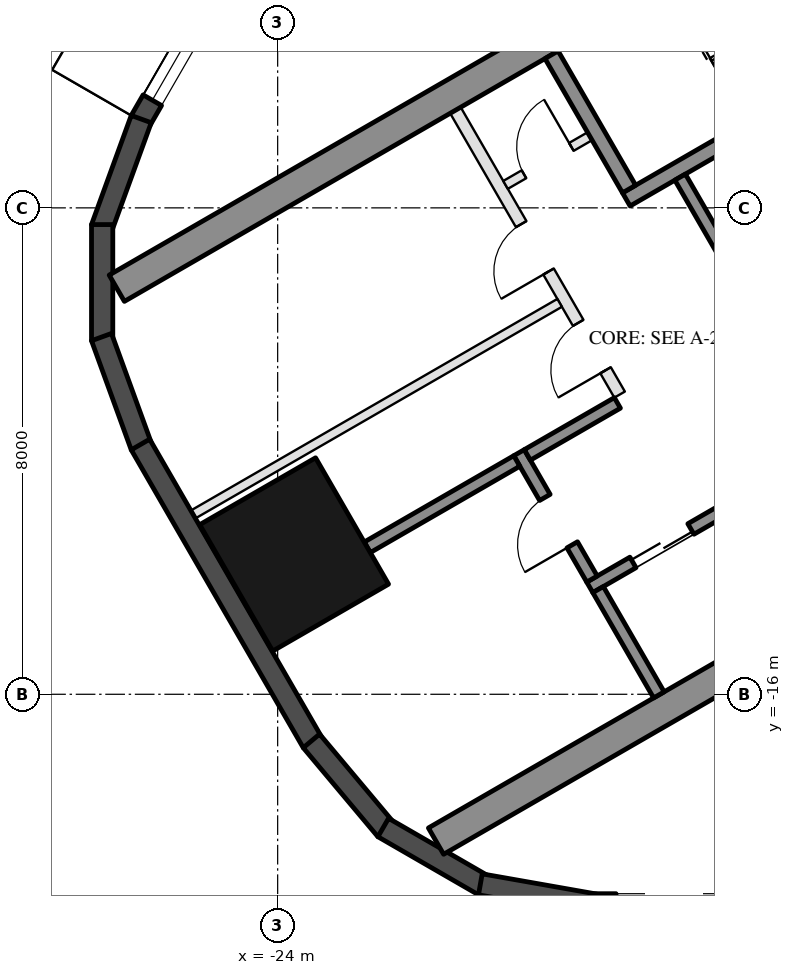
"""IFC4 building model, lengths in metres.
Left out: names, types, materials, properties, quantities, classifications, styles, units other than length and angle.
Written with IfcOpenShell. Run it as: python <this file> out.ifc"""

import sys

from ifc_helpers import new_model, si_unit, direction, frame, frame_2d, origin, origin_2d, place, context, subcontext, project, spatial, rectangle, hollow_rectangle, extrude, element, fill, save


model = new_model("IFC4")
c1 = context("Model", 3, precision=1e-05, world=origin(), true_north=direction((0.0, 1.0)))
c2 = subcontext(c1, "Body", "Model", "MODEL_VIEW")
j1 = project(units=[si_unit("LENGTHUNIT", "METRE"), si_unit("PLANEANGLEUNIT", "RADIAN")], contexts=[c1])
p1 = place(None, origin())
s1 = spatial("IfcSite", under=j1, at=p1, CompositionType="ELEMENT")
p2 = place(p1, origin())
s2 = spatial("IfcBuilding", under=s1, at=p2, CompositionType="ELEMENT")
p3 = place(p2, frame((0.0, 0.0, 224.3)))
s3 = spatial("IfcBuildingStorey", under=s2, at=p3, CompositionType="ELEMENT", Elevation=224.3)
p4 = place(p3, frame((-23.729, -13.7, 0.0), z_axis=(0.0, 0.0, 1.0), x_axis=(-0.5, 0.866025403784, 0.0)))
e1 = element("IfcColumn", 1, at=p4, inside=s3, PredefinedType="COLUMN", context=c2, shape_type="SweptSolid", body=[
    extrude(hollow_rectangle(XDim=2.4, YDim=2.2, WallThickness=0.06, at=origin_2d()), origin(), (0.0, 0.0, 1.0), 3.7),
])
p5 = place(p3, frame((-24.299, -3.176, 0.0), z_axis=(0.0, 0.0, 1.0), x_axis=(-0.500028278809, -0.866009076391, 0.0)))
e2 = element("IfcWall", 2, at=p5, inside=s3, PredefinedType="SOLIDWALL", context=c2, shape_type="SweptSolid", body=[
    extrude(rectangle(XDim=3.916, YDim=0.35, at=frame_2d((1.958, 0.0))), origin(), (0.0, 0.0, 1.0), 3.55),
])
p6 = place(p5, frame((1.625, 0.0, 0.3)))
e3 = element("IfcOpeningElement", 3, at=p6, cuts=e2, PredefinedType="OPENING", context=c2, shape_type="SweptSolid", body=[
    extrude(rectangle(XDim=1.9, YDim=2.65, at=frame_2d((0.95, 1.325))), frame((0.0, 0.185, 0.0), z_axis=(0.0, -1.0, 0.0), x_axis=(1.0, 0.0, 0.0)), (0.0, 0.0, 1.0), 0.37),
])
for number, where, z_axis, x_axis in (
    (4, (-26.244, -6.54, 0.0), (0.0, 0.0, 1.0), (-0.342, -0.94, 0.0)),
    (5, (-26.886, -8.275, 0.0), (0.0, 0.0, 1.0), (0.0, -1.0, 0.0)),
    (6, (-26.897, -10.125, 0.0), (0.0, 0.0, 1.0), (0.342, -0.94, 0.0)),
):
    element("IfcWall", number, at=place(p3, frame(where, z_axis=z_axis, x_axis=x_axis)), inside=s3, PredefinedType="SOLIDWALL", context=c2, shape_type="SweptSolid", body=[
        extrude(rectangle(XDim=1.91, YDim=0.35, at=frame_2d((0.955, 0.0))), origin(), (0.0, 0.0, 1.0), 3.55),
    ])
p7 = place(p3, frame((-26.257, -11.893, 0.0), z_axis=(0.0, 0.0, 1.0), x_axis=(0.500018773155, -0.866014564827, 0.0)))
e7 = element("IfcWall", 7, at=p7, inside=s3, PredefinedType="SOLIDWALL", context=c2, shape_type="SweptSolid", body=[
    extrude(rectangle(XDim=5.658, YDim=0.35, at=frame_2d((2.829, 0.0))), origin(), (0.0, 0.0, 1.0), 3.55),
])
for number, where, z_axis, x_axis in (
    (8, (-23.445, -16.768, 0.0), (0.0, 0.0, 1.0), (0.643, -0.766, 0.0)),
    (9, (-22.264, -18.192, 0.0), (0.0, 0.0, 1.0), (0.866, -0.5, 0.0)),
):
    element("IfcWall", number, at=place(p3, frame(where, z_axis=z_axis, x_axis=x_axis)), inside=s3, PredefinedType="SOLIDWALL", context=c2, shape_type="SweptSolid", body=[
        extrude(rectangle(XDim=1.91, YDim=0.35, at=frame_2d((0.955, 0.0))), origin(), (0.0, 0.0, 1.0), 3.55),
    ])
p8 = place(p3, frame((-20.667, -19.126, 0.0), z_axis=(0.0, 0.0, 1.0), x_axis=(0.984798995425, -0.173697837091, 0.0)))
e10 = element("IfcWall", 10, at=p8, inside=s3, PredefinedType="SOLIDWALL", context=c2, shape_type="SweptSolid", body=[
    extrude(rectangle(XDim=1.91, YDim=0.35, at=frame_2d((0.955, 0.0))), origin(), (0.0, 0.0, 1.0), 3.55),
])
p9 = place(p3, frame((-18.816, -19.455, 0.0), z_axis=(0.0, 0.0, 1.0), x_axis=(1.0, 0.0, 0.0)))
e11 = element("IfcWall", 11, at=p9, inside=s3, PredefinedType="SOLIDWALL", context=c2, shape_type="SweptSolid", body=[
    extrude(rectangle(XDim=11.816, YDim=0.35, at=frame_2d((5.908, 0.0))), origin(), (0.0, 0.0, 1.0), 3.55),
])
p10 = place(p9, frame((0.381, 0.0, 0.3)))
e12 = element("IfcOpeningElement", 12, at=p10, cuts=e11, PredefinedType="OPENING", context=c2, shape_type="SweptSolid", body=[
    extrude(rectangle(XDim=1.9, YDim=2.65, at=frame_2d((0.95, 1.325))), frame((0.0, 0.185, 0.0), z_axis=(0.0, -1.0, 0.0), x_axis=(1.0, 0.0, 0.0)), (0.0, 0.0, 1.0), 0.37),
])
p11 = place(p9, frame((7.79, 0.0, 0.0)))
e13 = element("IfcOpeningElement", 13, at=p11, cuts=e11, PredefinedType="OPENING", context=c2, shape_type="SweptSolid", body=[
    extrude(rectangle(XDim=2.4, YDim=2.4, at=frame_2d((1.2, 1.2))), frame((0.0, 0.185, 0.0), z_axis=(0.0, -1.0, 0.0), x_axis=(1.0, 0.0, 0.0)), (0.0, 0.0, 1.0), 0.37),
])
p12 = place(p9, frame((3.741, 0.0, 0.3)))
e14 = element("IfcOpeningElement", 14, at=p12, cuts=e11, PredefinedType="OPENING", context=c2, shape_type="SweptSolid", body=[
    extrude(rectangle(XDim=1.7, YDim=2.65, at=frame_2d((0.85, 1.325))), frame((0.0, 0.185, 0.0), z_axis=(0.0, -1.0, 0.0), x_axis=(1.0, 0.0, 0.0)), (0.0, 0.0, 1.0), 0.37),
])
p13 = place(p9, frame((5.741, 0.0, 0.3)))
e15 = element("IfcOpeningElement", 15, at=p13, cuts=e11, PredefinedType="OPENING", context=c2, shape_type="SweptSolid", body=[
    extrude(rectangle(XDim=1.7, YDim=2.65, at=frame_2d((0.85, 1.325))), frame((0.0, 0.185, 0.0), z_axis=(0.0, -1.0, 0.0), x_axis=(1.0, 0.0, 0.0)), (0.0, 0.0, 1.0), 0.37),
])
for number, where, z_axis, x_axis in (
    (16, (-13.797, -1.903, 0.0), (0.0, 0.0, 1.0), (-0.866, -0.5, 0.0)),
    (17, (-8.547, -10.997, 0.0), (0.0, 0.0, 1.0), (-0.866, -0.5, 0.0)),
):
    element("IfcWall", number, at=place(p3, frame(where, z_axis=z_axis, x_axis=x_axis)), inside=s3, PredefinedType="SHEAR", context=c2, shape_type="SweptSolid", body=[
        extrude(rectangle(XDim=14.837, YDim=0.5, at=frame_2d((7.418, 0.0))), origin(), (0.0, 0.0, 1.0), 3.5),
    ])
p14 = place(p3, frame((-12.681, -4.636, 0.0), z_axis=(0.0, 0.0, 1.0), x_axis=(-0.866021702275, -0.500006411147, 0.0)))
e18 = element("IfcWall", 18, at=p14, inside=s3, PredefinedType="SHEAR", context=c2, shape_type="SweptSolid", body=[
    extrude(rectangle(XDim=6.45, YDim=0.25, at=frame_2d((3.225, 0.0))), origin(), (0.0, 0.0, 1.0), 3.5),
])
p15 = place(p14, frame((0.3, 0.0, 0.0)))
e19 = element("IfcOpeningElement", 19, at=p15, cuts=e18, PredefinedType="OPENING", context=c2, shape_type="SweptSolid", body=[
    extrude(rectangle(XDim=1.0, YDim=2.1, at=frame_2d((0.5, 1.05))), frame((0.0, 0.135, 0.0), z_axis=(0.0, -1.0, 0.0), x_axis=(1.0, 0.0, 0.0)), (0.0, 0.0, 1.0), 0.27),
])
p16 = place(p3, frame((-19.496, -5.482, 0.0), z_axis=(0.0, 0.0, 1.0), x_axis=(0.499990435942, -0.866030925526, 0.0)))
e20 = element("IfcWall", 20, at=p16, inside=s3, PredefinedType="SHEAR", context=c2, shape_type="SweptSolid", body=[
    extrude(rectangle(XDim=2.55, YDim=0.25, at=frame_2d((1.275, 0.0))), origin(), (0.0, 0.0, 1.0), 3.5),
])
p17 = place(p3, frame((-17.381, -7.495, 0.0), z_axis=(0.0, 0.0, 1.0), x_axis=(0.500011755427, -0.866018616679, 0.0)))
e21 = element("IfcWall", 21, at=p17, inside=s3, PredefinedType="SHEAR", context=c2, shape_type="SweptSolid", body=[
    extrude(rectangle(XDim=2.8, YDim=0.2, at=frame_2d((1.4, 0.0))), origin(), (0.0, 0.0, 1.0), 3.5),
])
p18 = place(p3, frame((-10.068, -9.162, 0.0), z_axis=(0.0, 0.0, 1.0), x_axis=(-0.866032725843, -0.499987317609, 0.0)))
e22 = element("IfcWall", 22, at=p18, inside=s3, PredefinedType="SHEAR", context=c2, shape_type="SweptSolid", body=[
    extrude(rectangle(XDim=10.16, YDim=0.2, at=frame_2d((5.08, 0.0))), origin(), (0.0, 0.0, 1.0), 3.5),
])
p19 = place(p18, frame((0.62, 0.0, 0.0)))
e23 = element("IfcOpeningElement", 23, at=p19, cuts=e22, PredefinedType="OPENING", context=c2, shape_type="SweptSolid", body=[
    extrude(rectangle(XDim=1.1, YDim=2.1, at=frame_2d((0.55, 1.05))), frame((0.0, 0.11, 0.0), z_axis=(0.0, -1.0, 0.0), x_axis=(1.0, 0.0, 0.0)), (0.0, 0.0, 1.0), 0.22),
])
p20 = place(p18, frame((3.16, 0.0, 0.0)))
e24 = element("IfcOpeningElement", 24, at=p20, cuts=e22, PredefinedType="OPENING", context=c2, shape_type="SweptSolid", body=[
    extrude(rectangle(XDim=1.1, YDim=2.1, at=frame_2d((0.55, 1.05))), frame((0.0, 0.11, 0.0), z_axis=(0.0, -1.0, 0.0), x_axis=(1.0, 0.0, 0.0)), (0.0, 0.0, 1.0), 0.22),
])
p21 = place(p18, frame((5.7, 0.0, 0.0)))
e25 = element("IfcOpeningElement", 25, at=p21, cuts=e22, PredefinedType="OPENING", context=c2, shape_type="SweptSolid", body=[
    extrude(rectangle(XDim=1.1, YDim=2.1, at=frame_2d((0.55, 1.05))), frame((0.0, 0.11, 0.0), z_axis=(0.0, -1.0, 0.0), x_axis=(1.0, 0.0, 0.0)), (0.0, 0.0, 1.0), 0.22),
])
p22 = place(p18, frame((8.24, 0.0, 0.0)))
e26 = element("IfcOpeningElement", 26, at=p22, cuts=e22, PredefinedType="OPENING", context=c2, shape_type="SweptSolid", body=[
    extrude(rectangle(XDim=1.1, YDim=2.1, at=frame_2d((0.55, 1.05))), frame((0.0, 0.11, 0.0), z_axis=(0.0, -1.0, 0.0), x_axis=(1.0, 0.0, 0.0)), (0.0, 0.0, 1.0), 0.22),
])
p23 = place(p3, frame((-20.031, -12.026, 0.0), z_axis=(0.0, 0.0, 1.0), x_axis=(0.500033551112, -0.866006032174, 0.0)))
e27 = element("IfcWall", 27, at=p23, inside=s3, PredefinedType="SHEAR", context=c2, shape_type="SweptSolid", body=[
    extrude(rectangle(XDim=2.4, YDim=0.2, at=frame_2d((1.2, 0.0))), origin(), (0.0, 0.0, 1.0), 3.5),
])
p24 = place(p23, frame((0.85, 0.0, 0.0)))
e28 = element("IfcOpeningElement", 28, at=p24, cuts=e27, PredefinedType="OPENING", context=c2, shape_type="SweptSolid", body=[
    extrude(rectangle(XDim=0.9, YDim=2.1, at=frame_2d((0.45, 1.05))), frame((0.0, 0.11, 0.0), z_axis=(0.0, -1.0, 0.0), x_axis=(1.0, 0.0, 0.0)), (0.0, 0.0, 1.0), 0.22),
])
p25 = place(p3, frame((-18.413, -11.208, 0.0), z_axis=(0.0, 0.0, 1.0), x_axis=(-0.866038183914, -0.499977863513, 0.0)))
e29 = element("IfcWall", 29, at=p25, inside=s3, PredefinedType="SHEAR", context=c2, shape_type="SweptSolid", body=[
    extrude(rectangle(XDim=1.71, YDim=0.2, at=frame_2d((0.855, 0.0))), origin(), (0.0, 0.0, 1.0), 3.5),
])
p26 = place(p3, frame((-18.73, -14.278, 0.0), z_axis=(0.0, 0.0, 1.0), x_axis=(0.50002537861, -0.866010750942, 0.0)))
e30 = element("IfcWall", 30, at=p26, inside=s3, PredefinedType="SHEAR", context=c2, shape_type="SweptSolid", body=[
    extrude(rectangle(XDim=2.0, YDim=0.2, at=frame_2d((1.0, 0.0))), origin(), (0.0, 0.0, 1.0), 3.5),
])
p27 = place(p3, frame((-20.067, -12.163, 0.0), z_axis=(0.0, 0.0, 1.0), x_axis=(-0.866055327414, -0.49994816717, 0.0)))
e31 = element("IfcWall", 31, at=p27, inside=s3, PredefinedType="SHEAR", context=c2, shape_type="SweptSolid", body=[
    extrude(rectangle(XDim=2.84, YDim=0.2, at=frame_2d((1.42, 0.0))), origin(), (0.0, 0.0, 1.0), 3.5),
])
p28 = place(p3, frame((-21.076, -6.395, 0.0), z_axis=(0.0, 0.0, 1.0), x_axis=(0.50001468107, -0.866016927499, 0.0)))
e32 = element("IfcWall", 32, at=p28, inside=s3, PredefinedType="PARTITIONING", context=c2, shape_type="SweptSolid", body=[
    extrude(rectangle(XDim=5.4, YDim=0.2, at=frame_2d((2.7, 0.0))), origin(), (0.0, 0.0, 1.0), 3.5),
])
p29 = place(p28, frame((2.163, 0.0, 0.0)))
e33 = element("IfcOpeningElement", 33, at=p29, cuts=e32, PredefinedType="OPENING", context=c2, shape_type="SweptSolid", body=[
    extrude(rectangle(XDim=0.9, YDim=2.1, at=frame_2d((0.45, 1.05))), frame((0.0, 0.11, 0.0), z_axis=(0.0, -1.0, 0.0), x_axis=(1.0, 0.0, 0.0)), (0.0, 0.0, 1.0), 0.22),
])
p30 = place(p28, frame((4.038, 0.0, 0.0)))
e34 = element("IfcOpeningElement", 34, at=p30, cuts=e32, PredefinedType="OPENING", context=c2, shape_type="SweptSolid", body=[
    extrude(rectangle(XDim=0.9, YDim=2.1, at=frame_2d((0.45, 1.05))), frame((0.0, 0.11, 0.0), z_axis=(0.0, -1.0, 0.0), x_axis=(1.0, 0.0, 0.0)), (0.0, 0.0, 1.0), 0.22),
])
p31 = place(p3, frame((-18.866, -6.822, 0.0), z_axis=(0.0, 0.0, 1.0), x_axis=(-0.866028054938, -0.499995408039, 0.0)))
e35 = element("IfcWall", 35, at=p31, inside=s3, PredefinedType="PARTITIONING", context=c2, shape_type="SweptSolid", body=[
    extrude(rectangle(XDim=1.6, YDim=0.15, at=frame_2d((0.8, 0.0))), origin(), (0.0, 0.0, 1.0), 3.5),
])
p32 = place(p31, frame((0.35, 0.0, 0.0)))
e36 = element("IfcOpeningElement", 36, at=p32, cuts=e35, PredefinedType="OPENING", context=c2, shape_type="SweptSolid", body=[
    extrude(rectangle(XDim=0.9, YDim=2.1, at=frame_2d((0.45, 1.05))), frame((0.0, 0.085, 0.0), z_axis=(0.0, -1.0, 0.0), x_axis=(1.0, 0.0, 0.0)), (0.0, 0.0, 1.0), 0.17),
])
p33 = place(p3, frame((-19.363, -9.562, 0.0), z_axis=(0.0, 0.0, 1.0), x_axis=(-0.866016523273, -0.500015381182, 0.0)))
e37 = element("IfcWall", 37, at=p33, inside=s3, PredefinedType="PARTITIONING", context=c2, shape_type="SweptSolid", body=[
    extrude(rectangle(XDim=6.95, YDim=0.15, at=frame_2d((3.475, 0.0))), origin(), (0.0, 0.0, 1.0), 3.5),
])
p34 = place(p6, origin())
e38 = element("IfcWindow", 38, at=p34, inside=s3, PartitioningType="SINGLE_PANEL", PredefinedType="WINDOW", context=c2, shape_type="SweptSolid", body=[
    extrude(rectangle(XDim=1.9, YDim=2.65, at=frame_2d((0.95, 1.325))), frame((0.0, 0.03, 0.0), z_axis=(0.0, -1.0, 0.0), x_axis=(1.0, 0.0, 0.0)), (0.0, 0.0, 1.0), 0.06),
])
fill(e3, e38)
p35 = place(p32, frame((0.9, 0.0, 0.0), z_axis=(0.0, 0.0, 1.0), x_axis=(-1.0, 0.0, 0.0)))
e39 = element("IfcDoor", 39, at=p35, inside=s3, OperationType="SINGLE_SWING_RIGHT", PredefinedType="DOOR", context=c2, shape_type="SweptSolid", body=[
    extrude(rectangle(XDim=0.9, YDim=2.1, at=frame_2d((0.45, 1.05))), frame((0.0, 0.025, 0.0), z_axis=(0.0, -1.0, 0.0), x_axis=(1.0, 0.0, 0.0)), (0.0, 0.0, 1.0), 0.05),
])
fill(e36, e39)
p36 = place(p22, origin())
e40 = element("IfcDoor", 40, at=p36, inside=s3, OperationType="DOUBLE_DOOR_SLIDING", PredefinedType="DOOR", context=c2, shape_type="SweptSolid", body=[
    extrude(rectangle(XDim=1.1, YDim=2.1, at=frame_2d((0.55, 1.05))), frame((0.0, 0.025, 0.0), z_axis=(0.0, -1.0, 0.0), x_axis=(1.0, 0.0, 0.0)), (0.0, 0.0, 1.0), 0.05),
])
fill(e26, e40)
p37 = place(p24, frame((0.9, 0.0, 0.0), z_axis=(0.0, 0.0, 1.0), x_axis=(-1.0, 0.0, 0.0)))
e41 = element("IfcDoor", 41, at=p37, inside=s3, OperationType="SINGLE_SWING_LEFT", PredefinedType="DOOR", context=c2, shape_type="SweptSolid", body=[
    extrude(rectangle(XDim=0.9, YDim=2.1, at=frame_2d((0.45, 1.05))), frame((0.0, 0.025, 0.0), z_axis=(0.0, -1.0, 0.0), x_axis=(1.0, 0.0, 0.0)), (0.0, 0.0, 1.0), 0.05),
])
fill(e28, e41)
p38 = place(p29, frame((0.9, 0.0, 0.0), z_axis=(0.0, 0.0, 1.0), x_axis=(-1.0, 0.0, 0.0)))
e42 = element("IfcDoor", 42, at=p38, inside=s3, OperationType="SINGLE_SWING_LEFT", PredefinedType="DOOR", context=c2, shape_type="SweptSolid", body=[
    extrude(rectangle(XDim=0.9, YDim=2.1, at=frame_2d((0.45, 1.05))), frame((0.0, 0.025, 0.0), z_axis=(0.0, -1.0, 0.0), x_axis=(1.0, 0.0, 0.0)), (0.0, 0.0, 1.0), 0.05),
])
fill(e33, e42)
p39 = place(p30, frame((0.9, 0.0, 0.0), z_axis=(0.0, 0.0, 1.0), x_axis=(-1.0, 0.0, 0.0)))
e43 = element("IfcDoor", 43, at=p39, inside=s3, OperationType="SINGLE_SWING_LEFT", PredefinedType="DOOR", context=c2, shape_type="SweptSolid", body=[
    extrude(rectangle(XDim=0.9, YDim=2.1, at=frame_2d((0.45, 1.05))), frame((0.0, 0.025, 0.0), z_axis=(0.0, -1.0, 0.0), x_axis=(1.0, 0.0, 0.0)), (0.0, 0.0, 1.0), 0.05),
])
fill(e34, e43)
save(model, sys.argv[1])
